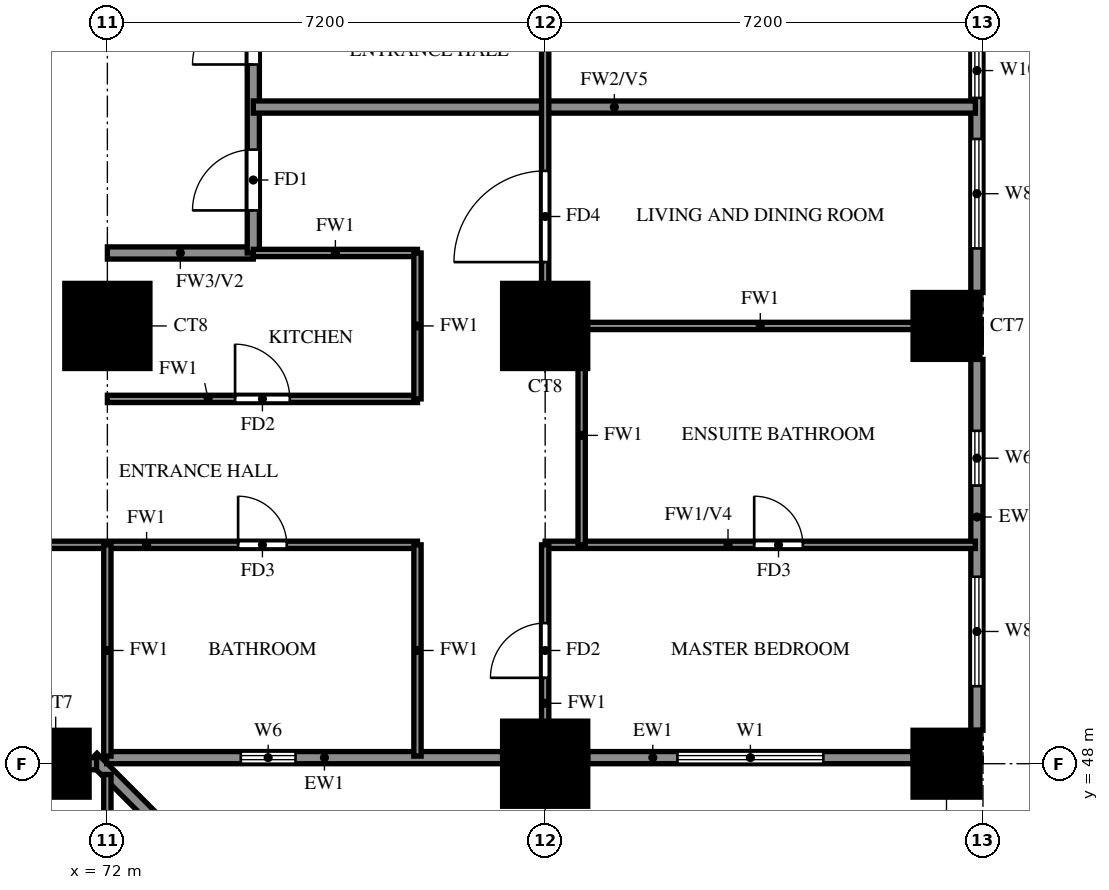
"""IFC4 building model, lengths in metres.
Left out: names, types, materials, properties, quantities, classifications, styles, units other than length and angle.
Written with IfcOpenShell. Run it as: python <this file> out.ifc"""

import sys

from ifc_helpers import new_model, si_unit, direction, frame, frame_2d, origin, origin_2d, place, context, subcontext, project, spatial, rectangle, extrude, source, transform, mapped, element, fill, save


model = new_model("IFC4")
c1 = context("Model", 3, precision=1e-05, world=origin(), true_north=direction((0.0, 1.0)))
c2 = subcontext(c1, "Body", "Model", "MODEL_VIEW")
j1 = project(units=[si_unit("LENGTHUNIT", "METRE"), si_unit("PLANEANGLEUNIT", "RADIAN")], contexts=[c1])
p1 = place(None, origin())
s1 = spatial("IfcSite", under=j1, at=p1, CompositionType="ELEMENT")
p2 = place(p1, origin())
s2 = spatial("IfcBuilding", under=s1, at=p2, CompositionType="ELEMENT")
p3 = place(p2, frame((0.0, 0.0, 58.5)))
s3 = spatial("IfcBuildingStorey", under=s2, at=p3, CompositionType="ELEMENT", Elevation=58.5)
m1 = source(origin(), c2, "Body", "SweptSolid", [
    extrude(rectangle(XDim=1.1, YDim=1.1, at=origin_2d()), origin(), (0.0, 0.0, 1.0), 3.18),
])
p4 = place(p3, frame((71.15, 48.0, 0.0), z_axis=(0.0, 0.0, 1.0), x_axis=(1.0, 0.0, 0.0)))
e1 = element("IfcColumn", 1, at=p4, inside=s3, PredefinedType="COLUMN", context=c2, shape_type="MappedRepresentation", body=[
    mapped(m1, transform((0.0, 0.0, 0.0))),
])
m2 = source(origin(), c2, "Body", "SweptSolid", [
    extrude(rectangle(XDim=1.4, YDim=1.4, at=origin_2d()), origin(), (0.0, 0.0, 1.0), 3.18),
])
p5 = place(p3, frame((79.2, 48.0, 0.0), z_axis=(0.0, 0.0, 1.0), x_axis=(1.0, 0.0, 0.0)))
e2 = element("IfcColumn", 2, at=p5, inside=s3, PredefinedType="COLUMN", context=c2, shape_type="MappedRepresentation", body=[
    mapped(m2, transform((0.0, 0.0, 0.0))),
])
p6 = place(p3, frame((85.8, 48.0, 0.0), z_axis=(0.0, 0.0, 1.0), x_axis=(1.0, 0.0, 0.0)))
e3 = element("IfcColumn", 3, at=p6, inside=s3, PredefinedType="COLUMN", context=c2, shape_type="MappedRepresentation", body=[
    mapped(m1, transform((0.0, 0.0, 0.0))),
])
for number, where, z_axis, x_axis in (
    (4, (72.0, 55.2, 0.0), (0.0, 0.0, 1.0), (1.0, 0.0, 0.0)),
    (5, (79.2, 55.2, 0.0), (0.0, 0.0, 1.0), (1.0, 0.0, 0.0)),
):
    element("IfcColumn", number, at=place(p3, frame(where, z_axis=z_axis, x_axis=x_axis)), inside=s3, PredefinedType="COLUMN", context=c2, shape_type="MappedRepresentation", body=[
        mapped(m2, transform((0.0, 0.0, 0.0))),
    ])
p7 = place(p3, frame((85.8, 55.2, 0.0), z_axis=(0.0, 0.0, 1.0), x_axis=(1.0, 0.0, 0.0)))
e6 = element("IfcColumn", 6, at=p7, inside=s3, PredefinedType="COLUMN", context=c2, shape_type="MappedRepresentation", body=[
    mapped(m1, transform((0.0, 0.0, 0.0))),
])
p8 = place(p3, frame((78.74, 41.118, 0.0), z_axis=(0.0, 0.0, 1.0), x_axis=(-0.707106781187, 0.707106781187, 0.0)))
e7 = element("IfcWall", 7, at=p8, inside=s3, PredefinedType="SOLIDWALL", context=c2, shape_type="SweptSolid", body=[
    extrude(rectangle(XDim=9.874, YDim=0.2, at=frame_2d((4.937, 0.0))), origin(), (0.0, 0.0, 1.0), 3.18),
])
p9 = place(p8, frame((2.264, 0.0, 0.6)))
e8 = element("IfcOpeningElement", 8, at=p9, cuts=e7, PredefinedType="OPENING", context=c2, shape_type="SweptSolid", body=[
    extrude(rectangle(XDim=2.4, YDim=2.4, at=frame_2d((1.2, 1.2))), frame((0.0, 0.11, 0.0), z_axis=(0.0, -1.0, 0.0), x_axis=(1.0, 0.0, 0.0)), (0.0, 0.0, 1.0), 0.22),
])
p10 = place(p8, frame((5.836, 0.0, 0.6)))
e9 = element("IfcOpeningElement", 9, at=p10, cuts=e7, PredefinedType="OPENING", context=c2, shape_type="SweptSolid", body=[
    extrude(rectangle(XDim=2.4, YDim=2.4, at=frame_2d((1.2, 1.2))), frame((0.0, 0.11, 0.0), z_axis=(0.0, -1.0, 0.0), x_axis=(1.0, 0.0, 0.0)), (0.0, 0.0, 1.0), 0.22),
])
p11 = place(p3, frame((71.989, 48.1, 0.0), z_axis=(0.0, 0.0, 1.0), x_axis=(1.0, 0.0, 0.0)))
e10 = element("IfcWall", 10, at=p11, inside=s3, PredefinedType="SOLIDWALL", context=c2, shape_type="SweptSolid", body=[
    extrude(rectangle(XDim=6.511, YDim=0.2, at=frame_2d((3.256, 0.0))), origin(), (0.0, 0.0, 1.0), 3.18),
])
p12 = place(p11, frame((2.206, 0.0, 1.5)))
e11 = element("IfcOpeningElement", 11, at=p12, cuts=e10, PredefinedType="OPENING", context=c2, shape_type="SweptSolid", body=[
    extrude(rectangle(XDim=0.9, YDim=0.9, at=frame_2d((0.45, 0.45))), frame((0.0, 0.11, 0.0), z_axis=(0.0, -1.0, 0.0), x_axis=(1.0, 0.0, 0.0)), (0.0, 0.0, 1.0), 0.22),
])
p13 = place(p3, frame((79.9, 48.1, 0.0), z_axis=(0.0, 0.0, 1.0), x_axis=(1.0, 0.0, 0.0)))
e12 = element("IfcWall", 12, at=p13, inside=s3, PredefinedType="SOLIDWALL", context=c2, shape_type="SweptSolid", body=[
    extrude(rectangle(XDim=5.35, YDim=0.2, at=frame_2d((2.675, 0.0))), origin(), (0.0, 0.0, 1.0), 3.18),
])
p14 = place(p13, frame((1.475, 0.0, 0.6)))
e13 = element("IfcOpeningElement", 13, at=p14, cuts=e12, PredefinedType="OPENING", context=c2, shape_type="SweptSolid", body=[
    extrude(rectangle(XDim=2.4, YDim=2.4, at=frame_2d((1.2, 1.2))), frame((0.0, 0.11, 0.0), z_axis=(0.0, -1.0, 0.0), x_axis=(1.0, 0.0, 0.0)), (0.0, 0.0, 1.0), 0.22),
])
p15 = place(p3, frame((86.3, 48.55, 0.0), z_axis=(0.0, 0.0, 1.0), x_axis=(0.0, 1.0, 0.0)))
e14 = element("IfcWall", 14, at=p15, inside=s3, PredefinedType="SOLIDWALL", context=c2, shape_type="SweptSolid", body=[
    extrude(rectangle(XDim=6.1, YDim=0.2, at=frame_2d((3.05, 0.0))), origin(), (0.0, 0.0, 1.0), 3.18),
])
p16 = place(p15, frame((0.725, 0.0, 0.6)))
e15 = element("IfcOpeningElement", 15, at=p16, cuts=e14, PredefinedType="OPENING", context=c2, shape_type="SweptSolid", body=[
    extrude(rectangle(XDim=1.8, YDim=2.4, at=frame_2d((0.9, 1.2))), frame((0.0, 0.11, 0.0), z_axis=(0.0, -1.0, 0.0), x_axis=(1.0, 0.0, 0.0)), (0.0, 0.0, 1.0), 0.22),
])
p17 = place(p15, frame((4.025, 0.0, 1.5)))
e16 = element("IfcOpeningElement", 16, at=p17, cuts=e14, PredefinedType="OPENING", context=c2, shape_type="SweptSolid", body=[
    extrude(rectangle(XDim=0.9, YDim=0.9, at=frame_2d((0.45, 0.45))), frame((0.0, 0.11, 0.0), z_axis=(0.0, -1.0, 0.0), x_axis=(1.0, 0.0, 0.0)), (0.0, 0.0, 1.0), 0.22),
])
p18 = place(p3, frame((86.3, 55.75, 0.0), z_axis=(0.0, 0.0, 1.0), x_axis=(0.0, 1.0, 0.0)))
e17 = element("IfcWall", 17, at=p18, inside=s3, PredefinedType="SOLIDWALL", context=c2, shape_type="SweptSolid", body=[
    extrude(rectangle(XDim=6.1, YDim=0.2, at=frame_2d((3.05, 0.0))), origin(), (0.0, 0.0, 1.0), 3.18),
])
p19 = place(p18, frame((0.725, 0.0, 0.6)))
e18 = element("IfcOpeningElement", 18, at=p19, cuts=e17, PredefinedType="OPENING", context=c2, shape_type="SweptSolid", body=[
    extrude(rectangle(XDim=1.8, YDim=2.4, at=frame_2d((0.9, 1.2))), frame((0.0, 0.11, 0.0), z_axis=(0.0, -1.0, 0.0), x_axis=(1.0, 0.0, 0.0)), (0.0, 0.0, 1.0), 0.22),
])
p20 = place(p18, frame((3.2, 0.0, 0.6)))
e19 = element("IfcOpeningElement", 19, at=p20, cuts=e17, PredefinedType="OPENING", context=c2, shape_type="SweptSolid", body=[
    extrude(rectangle(XDim=0.9, YDim=2.4, at=frame_2d((0.45, 1.2))), frame((0.0, 0.11, 0.0), z_axis=(0.0, -1.0, 0.0), x_axis=(1.0, 0.0, 0.0)), (0.0, 0.0, 1.0), 0.22),
])
p21 = place(p3, frame((72.0, 56.4, 0.0), z_axis=(0.0, 0.0, 1.0), x_axis=(1.0, 0.0, 0.0)))
e20 = element("IfcWall", 20, at=p21, inside=s3, PredefinedType="SOLIDWALL", context=c2, shape_type="SweptSolid", body=[
    extrude(rectangle(XDim=2.4, YDim=0.2, at=frame_2d((1.2, 0.0))), origin(), (0.0, 0.0, 1.0), 3.18),
])
p22 = place(p3, frame((74.4, 56.4, 0.0), z_axis=(0.0, 0.0, 1.0), x_axis=(0.0, 1.0, 0.0)))
e21 = element("IfcWall", 21, at=p22, inside=s3, PredefinedType="SOLIDWALL", context=c2, shape_type="SweptSolid", body=[
    extrude(rectangle(XDim=9.6, YDim=0.2, at=frame_2d((4.8, 0.0))), origin(), (0.0, 0.0, 1.0), 3.18),
])
p23 = place(p22, frame((0.7, 0.0, 0.0)))
e22 = element("IfcOpeningElement", 22, at=p23, cuts=e21, PredefinedType="OPENING", context=c2, shape_type="SweptSolid", body=[
    extrude(rectangle(XDim=1.0, YDim=2.1, at=frame_2d((0.5, 1.05))), frame((0.0, 0.11, 0.0), z_axis=(0.0, -1.0, 0.0), x_axis=(1.0, 0.0, 0.0)), (0.0, 0.0, 1.0), 0.22),
])
p24 = place(p22, frame((3.1, 0.0, 0.0)))
e23 = element("IfcOpeningElement", 23, at=p24, cuts=e21, PredefinedType="OPENING", context=c2, shape_type="SweptSolid", body=[
    extrude(rectangle(XDim=1.0, YDim=2.1, at=frame_2d((0.5, 1.05))), frame((0.0, 0.11, 0.0), z_axis=(0.0, -1.0, 0.0), x_axis=(1.0, 0.0, 0.0)), (0.0, 0.0, 1.0), 0.22),
])
p25 = place(p3, frame((67.2, 48.0, 0.0), z_axis=(0.0, 0.0, 1.0), x_axis=(1.0, 0.0, 0.0)))
e24 = element("IfcWall", 24, at=p25, inside=s3, PredefinedType="SOLIDWALL", context=c2, shape_type="SweptSolid", body=[
    extrude(rectangle(XDim=4.623, YDim=0.2, at=frame_2d((2.312, 0.0))), origin(), (0.0, 0.0, 1.0), 3.18),
])
p26 = place(p3, frame((74.4, 58.8, 0.0), z_axis=(0.0, 0.0, 1.0), x_axis=(1.0, 0.0, 0.0)))
e25 = element("IfcWall", 25, at=p26, inside=s3, PredefinedType="SOLIDWALL", context=c2, shape_type="SweptSolid", body=[
    extrude(rectangle(XDim=11.875, YDim=0.2, at=frame_2d((5.938, 0.0))), origin(), (0.0, 0.0, 1.0), 2.28),
])
p27 = place(p3, frame((67.2, 51.6, 0.0), z_axis=(0.0, 0.0, 1.0), x_axis=(1.0, 0.0, 0.0)))
e26 = element("IfcWall", 26, at=p27, inside=s3, PredefinedType="PARTITIONING", context=c2, shape_type="SweptSolid", body=[
    extrude(rectangle(XDim=9.9, YDim=0.12, at=frame_2d((4.95, 0.0))), origin(), (0.0, 0.0, 1.0), 3.18),
])
p28 = place(p27, frame((6.95, 0.0, 0.0)))
e27 = element("IfcOpeningElement", 27, at=p28, cuts=e26, PredefinedType="OPENING", context=c2, shape_type="SweptSolid", body=[
    extrude(rectangle(XDim=0.8, YDim=2.1, at=frame_2d((0.4, 1.05))), frame((0.0, 0.07, 0.0), z_axis=(0.0, -1.0, 0.0), x_axis=(1.0, 0.0, 0.0)), (0.0, 0.0, 1.0), 0.14),
])
p29 = place(p27, frame((1.95, 0.0, 0.0)))
e28 = element("IfcOpeningElement", 28, at=p29, cuts=e26, PredefinedType="OPENING", context=c2, shape_type="SweptSolid", body=[
    extrude(rectangle(XDim=0.9, YDim=2.1, at=frame_2d((0.45, 1.05))), frame((0.0, 0.07, 0.0), z_axis=(0.0, -1.0, 0.0), x_axis=(1.0, 0.0, 0.0)), (0.0, 0.0, 1.0), 0.14),
])
p30 = place(p3, frame((79.2, 51.6, 0.0), z_axis=(0.0, 0.0, 1.0), x_axis=(1.0, 0.0, 0.0)))
e29 = element("IfcWall", 29, at=p30, inside=s3, PredefinedType="PARTITIONING", context=c2, shape_type="SweptSolid", body=[
    extrude(rectangle(XDim=7.075, YDim=0.12, at=frame_2d((3.538, 0.0))), origin(), (0.0, 0.0, 1.0), 2.28),
])
p31 = place(p30, frame((3.438, 0.0, 0.0)))
e30 = element("IfcOpeningElement", 30, at=p31, cuts=e29, PredefinedType="OPENING", context=c2, shape_type="SweptSolid", body=[
    extrude(rectangle(XDim=0.8, YDim=2.1, at=frame_2d((0.4, 1.05))), frame((0.0, 0.07, 0.0), z_axis=(0.0, -1.0, 0.0), x_axis=(1.0, 0.0, 0.0)), (0.0, 0.0, 1.0), 0.14),
])
p32 = place(p3, frame((72.0, 54.0, 0.0), z_axis=(0.0, 0.0, 1.0), x_axis=(1.0, 0.0, 0.0)))
e31 = element("IfcWall", 31, at=p32, inside=s3, PredefinedType="PARTITIONING", context=c2, shape_type="SweptSolid", body=[
    extrude(rectangle(XDim=5.1, YDim=0.12, at=frame_2d((2.55, 0.0))), origin(), (0.0, 0.0, 1.0), 3.18),
])
p33 = place(p32, frame((2.1, 0.0, 0.0)))
e32 = element("IfcOpeningElement", 32, at=p33, cuts=e31, PredefinedType="OPENING", context=c2, shape_type="SweptSolid", body=[
    extrude(rectangle(XDim=0.9, YDim=2.1, at=frame_2d((0.45, 1.05))), frame((0.0, 0.07, 0.0), z_axis=(0.0, -1.0, 0.0), x_axis=(1.0, 0.0, 0.0)), (0.0, 0.0, 1.0), 0.14),
])
p34 = place(p3, frame((79.2, 55.2, 0.0), z_axis=(0.0, 0.0, 1.0), x_axis=(1.0, 0.0, 0.0)))
e33 = element("IfcWall", 33, at=p34, inside=s3, PredefinedType="PARTITIONING", context=c2, shape_type="SweptSolid", body=[
    extrude(rectangle(XDim=7.075, YDim=0.12, at=frame_2d((3.538, 0.0))), origin(), (0.0, 0.0, 1.0), 3.18),
])
p35 = place(p3, frame((74.4, 56.4, 0.0), z_axis=(0.0, 0.0, 1.0), x_axis=(1.0, 0.0, 0.0)))
e34 = element("IfcWall", 34, at=p35, inside=s3, PredefinedType="PARTITIONING", context=c2, shape_type="SweptSolid", body=[
    extrude(rectangle(XDim=2.7, YDim=0.12, at=frame_2d((1.35, 0.0))), origin(), (0.0, 0.0, 1.0), 3.18),
])
p36 = place(p3, frame((72.0, 33.725, 0.0), z_axis=(0.0, 0.0, 1.0), x_axis=(0.0, 1.0, 0.0)))
e35 = element("IfcWall", 35, at=p36, inside=s3, PredefinedType="PARTITIONING", context=c2, shape_type="SweptSolid", body=[
    extrude(rectangle(XDim=14.098, YDim=0.12, at=frame_2d((7.049, 0.0))), origin(), (0.0, 0.0, 1.0), 2.28),
])
p37 = place(p36, frame((10.075, 0.0, 0.0)))
e36 = element("IfcOpeningElement", 36, at=p37, cuts=e35, PredefinedType="OPENING", context=c2, shape_type="SweptSolid", body=[
    extrude(rectangle(XDim=0.9, YDim=2.1, at=frame_2d((0.45, 1.05))), frame((0.0, 0.07, 0.0), z_axis=(0.0, -1.0, 0.0), x_axis=(1.0, 0.0, 0.0)), (0.0, 0.0, 1.0), 0.14),
])
for number, where, z_axis, x_axis in (
    (37, (72.0, 48.125, 0.0), (0.0, 0.0, 1.0), (0.0, 1.0, 0.0)),
    (38, (77.1, 48.125, 0.0), (0.0, 0.0, 1.0), (0.0, 1.0, 0.0)),
):
    element("IfcWall", number, at=place(p3, frame(where, z_axis=z_axis, x_axis=x_axis)), inside=s3, PredefinedType="PARTITIONING", context=c2, shape_type="SweptSolid", body=[
        extrude(rectangle(XDim=3.475, YDim=0.12, at=frame_2d((1.738, 0.0))), origin(), (0.0, 0.0, 1.0), 3.18),
    ])
p38 = place(p3, frame((77.1, 54.0, 0.0), z_axis=(0.0, 0.0, 1.0), x_axis=(0.0, 1.0, 0.0)))
e39 = element("IfcWall", 39, at=p38, inside=s3, PredefinedType="PARTITIONING", context=c2, shape_type="SweptSolid", body=[
    extrude(rectangle(XDim=2.4, YDim=0.12, at=frame_2d((1.2, 0.0))), origin(), (0.0, 0.0, 1.0), 3.18),
])
p39 = place(p3, frame((79.2, 48.125, 0.0), z_axis=(0.0, 0.0, 1.0), x_axis=(0.0, 1.0, 0.0)))
e40 = element("IfcWall", 40, at=p39, inside=s3, PredefinedType="PARTITIONING", context=c2, shape_type="SweptSolid", body=[
    extrude(rectangle(XDim=3.475, YDim=0.12, at=frame_2d((1.738, 0.0))), origin(), (0.0, 0.0, 1.0), 3.18),
])
p40 = place(p39, frame((1.288, 0.0, 0.0)))
e41 = element("IfcOpeningElement", 41, at=p40, cuts=e40, PredefinedType="OPENING", context=c2, shape_type="SweptSolid", body=[
    extrude(rectangle(XDim=0.9, YDim=2.1, at=frame_2d((0.45, 1.05))), frame((0.0, 0.07, 0.0), z_axis=(0.0, -1.0, 0.0), x_axis=(1.0, 0.0, 0.0)), (0.0, 0.0, 1.0), 0.14),
])
p41 = place(p3, frame((79.2, 55.2, 0.0), z_axis=(0.0, 0.0, 1.0), x_axis=(0.0, 1.0, 0.0)))
e42 = element("IfcWall", 42, at=p41, inside=s3, PredefinedType="PARTITIONING", context=c2, shape_type="SweptSolid", body=[
    extrude(rectangle(XDim=14.4, YDim=0.12, at=frame_2d((7.2, 0.0))), origin(), (0.0, 0.0, 1.0), 3.18),
])
p42 = place(p41, frame((1.05, 0.0, 0.0)))
e43 = element("IfcOpeningElement", 43, at=p42, cuts=e42, PredefinedType="OPENING", context=c2, shape_type="SweptSolid", body=[
    extrude(rectangle(XDim=1.5, YDim=2.1, at=frame_2d((0.75, 1.05))), frame((0.0, 0.07, 0.0), z_axis=(0.0, -1.0, 0.0), x_axis=(1.0, 0.0, 0.0)), (0.0, 0.0, 1.0), 0.14),
])
p43 = place(p41, frame((4.95, 0.0, 0.0)))
e44 = element("IfcOpeningElement", 44, at=p43, cuts=e42, PredefinedType="OPENING", context=c2, shape_type="SweptSolid", body=[
    extrude(rectangle(XDim=0.9, YDim=2.1, at=frame_2d((0.45, 1.05))), frame((0.0, 0.07, 0.0), z_axis=(0.0, -1.0, 0.0), x_axis=(1.0, 0.0, 0.0)), (0.0, 0.0, 1.0), 0.14),
])
p44 = place(p41, frame((10.35, 0.0, 0.0)))
e45 = element("IfcOpeningElement", 45, at=p44, cuts=e42, PredefinedType="OPENING", context=c2, shape_type="SweptSolid", body=[
    extrude(rectangle(XDim=0.9, YDim=2.1, at=frame_2d((0.45, 1.05))), frame((0.0, 0.07, 0.0), z_axis=(0.0, -1.0, 0.0), x_axis=(1.0, 0.0, 0.0)), (0.0, 0.0, 1.0), 0.14),
])
p45 = place(p3, frame((79.8, 51.6, 0.0), z_axis=(0.0, 0.0, 1.0), x_axis=(0.0, 1.0, 0.0)))
e46 = element("IfcWall", 46, at=p45, inside=s3, PredefinedType="PARTITIONING", context=c2, shape_type="SweptSolid", body=[
    extrude(rectangle(XDim=3.6, YDim=0.12, at=frame_2d((1.8, 0.0))), origin(), (0.0, 0.0, 1.0), 3.18),
])
p46 = place(p12, origin())
e47 = element("IfcWindow", 47, at=p46, inside=s3, PartitioningType="SINGLE_PANEL", PredefinedType="WINDOW", context=c2, shape_type="SweptSolid", body=[
    extrude(rectangle(XDim=0.9, YDim=0.9, at=frame_2d((0.45, 0.45))), frame((0.0, 0.03, 0.0), z_axis=(0.0, -1.0, 0.0), x_axis=(1.0, 0.0, 0.0)), (0.0, 0.0, 1.0), 0.06),
])
fill(e11, e47)
p47 = place(p14, origin())
e48 = element("IfcWindow", 48, at=p47, inside=s3, PartitioningType="DOUBLE_PANEL_VERTICAL", PredefinedType="WINDOW", context=c2, shape_type="SweptSolid", body=[
    extrude(rectangle(XDim=2.4, YDim=2.4, at=frame_2d((1.2, 1.2))), frame((0.0, 0.03, 0.0), z_axis=(0.0, -1.0, 0.0), x_axis=(1.0, 0.0, 0.0)), (0.0, 0.0, 1.0), 0.06),
])
fill(e13, e48)
p48 = place(p16, origin())
e49 = element("IfcWindow", 49, at=p48, inside=s3, PartitioningType="DOUBLE_PANEL_VERTICAL", PredefinedType="WINDOW", context=c2, shape_type="SweptSolid", body=[
    extrude(rectangle(XDim=1.8, YDim=2.4, at=frame_2d((0.9, 1.2))), frame((0.0, 0.03, 0.0), z_axis=(0.0, -1.0, 0.0), x_axis=(1.0, 0.0, 0.0)), (0.0, 0.0, 1.0), 0.06),
])
fill(e15, e49)
p49 = place(p17, origin())
e50 = element("IfcWindow", 50, at=p49, inside=s3, PartitioningType="SINGLE_PANEL", PredefinedType="WINDOW", context=c2, shape_type="SweptSolid", body=[
    extrude(rectangle(XDim=0.9, YDim=0.9, at=frame_2d((0.45, 0.45))), frame((0.0, 0.03, 0.0), z_axis=(0.0, -1.0, 0.0), x_axis=(1.0, 0.0, 0.0)), (0.0, 0.0, 1.0), 0.06),
])
fill(e16, e50)
p50 = place(p19, origin())
e51 = element("IfcWindow", 51, at=p50, inside=s3, PartitioningType="DOUBLE_PANEL_VERTICAL", PredefinedType="WINDOW", context=c2, shape_type="SweptSolid", body=[
    extrude(rectangle(XDim=1.8, YDim=2.4, at=frame_2d((0.9, 1.2))), frame((0.0, 0.03, 0.0), z_axis=(0.0, -1.0, 0.0), x_axis=(1.0, 0.0, 0.0)), (0.0, 0.0, 1.0), 0.06),
])
fill(e18, e51)
p51 = place(p20, origin())
e52 = element("IfcWindow", 52, at=p51, inside=s3, PartitioningType="SINGLE_PANEL", PredefinedType="WINDOW", context=c2, shape_type="SweptSolid", body=[
    extrude(rectangle(XDim=0.9, YDim=2.4, at=frame_2d((0.45, 1.2))), frame((0.0, 0.03, 0.0), z_axis=(0.0, -1.0, 0.0), x_axis=(1.0, 0.0, 0.0)), (0.0, 0.0, 1.0), 0.06),
])
fill(e19, e52)
p52 = place(p23, origin())
e53 = element("IfcDoor", 53, at=p52, inside=s3, OperationType="SINGLE_SWING_LEFT", PredefinedType="DOOR", context=c2, shape_type="SweptSolid", body=[
    extrude(rectangle(XDim=1.0, YDim=2.1, at=frame_2d((0.5, 1.05))), frame((0.0, 0.025, 0.0), z_axis=(0.0, -1.0, 0.0), x_axis=(1.0, 0.0, 0.0)), (0.0, 0.0, 1.0), 0.05),
])
fill(e22, e53)
p53 = place(p40, origin())
e54 = element("IfcDoor", 54, at=p53, inside=s3, OperationType="SINGLE_SWING_LEFT", PredefinedType="DOOR", context=c2, shape_type="SweptSolid", body=[
    extrude(rectangle(XDim=0.9, YDim=2.1, at=frame_2d((0.45, 1.05))), frame((0.0, 0.025, 0.0), z_axis=(0.0, -1.0, 0.0), x_axis=(1.0, 0.0, 0.0)), (0.0, 0.0, 1.0), 0.05),
])
fill(e41, e54)
p54 = place(p31, origin())
e55 = element("IfcDoor", 55, at=p54, inside=s3, OperationType="SINGLE_SWING_RIGHT", PredefinedType="DOOR", context=c2, shape_type="SweptSolid", body=[
    extrude(rectangle(XDim=0.8, YDim=2.1, at=frame_2d((0.4, 1.05))), frame((0.0, 0.025, 0.0), z_axis=(0.0, -1.0, 0.0), x_axis=(1.0, 0.0, 0.0)), (0.0, 0.0, 1.0), 0.05),
])
fill(e30, e55)
p55 = place(p42, origin())
e56 = element("IfcDoor", 56, at=p55, inside=s3, OperationType="SINGLE_SWING_LEFT", PredefinedType="DOOR", context=c2, shape_type="SweptSolid", body=[
    extrude(rectangle(XDim=1.5, YDim=2.1, at=frame_2d((0.75, 1.05))), frame((0.0, 0.025, 0.0), z_axis=(0.0, -1.0, 0.0), x_axis=(1.0, 0.0, 0.0)), (0.0, 0.0, 1.0), 0.05),
])
fill(e43, e56)
p56 = place(p28, origin())
e57 = element("IfcDoor", 57, at=p56, inside=s3, OperationType="SINGLE_SWING_LEFT", PredefinedType="DOOR", context=c2, shape_type="SweptSolid", body=[
    extrude(rectangle(XDim=0.8, YDim=2.1, at=frame_2d((0.4, 1.05))), frame((0.0, 0.025, 0.0), z_axis=(0.0, -1.0, 0.0), x_axis=(1.0, 0.0, 0.0)), (0.0, 0.0, 1.0), 0.05),
])
fill(e27, e57)
p57 = place(p33, origin())
e58 = element("IfcDoor", 58, at=p57, inside=s3, OperationType="SINGLE_SWING_RIGHT", PredefinedType="DOOR", context=c2, shape_type="SweptSolid", body=[
    extrude(rectangle(XDim=0.9, YDim=2.1, at=frame_2d((0.45, 1.05))), frame((0.0, 0.025, 0.0), z_axis=(0.0, -1.0, 0.0), x_axis=(1.0, 0.0, 0.0)), (0.0, 0.0, 1.0), 0.05),
])
fill(e32, e58)
p58 = place(p24, origin())
e59 = element("IfcDoor", 59, at=p58, inside=s3, OperationType="SINGLE_SWING_LEFT", PredefinedType="DOOR", context=c2, shape_type="SweptSolid", body=[
    extrude(rectangle(XDim=1.0, YDim=2.1, at=frame_2d((0.5, 1.05))), frame((0.0, 0.025, 0.0), z_axis=(0.0, -1.0, 0.0), x_axis=(1.0, 0.0, 0.0)), (0.0, 0.0, 1.0), 0.05),
])
fill(e23, e59)
save(model, sys.argv[1])
